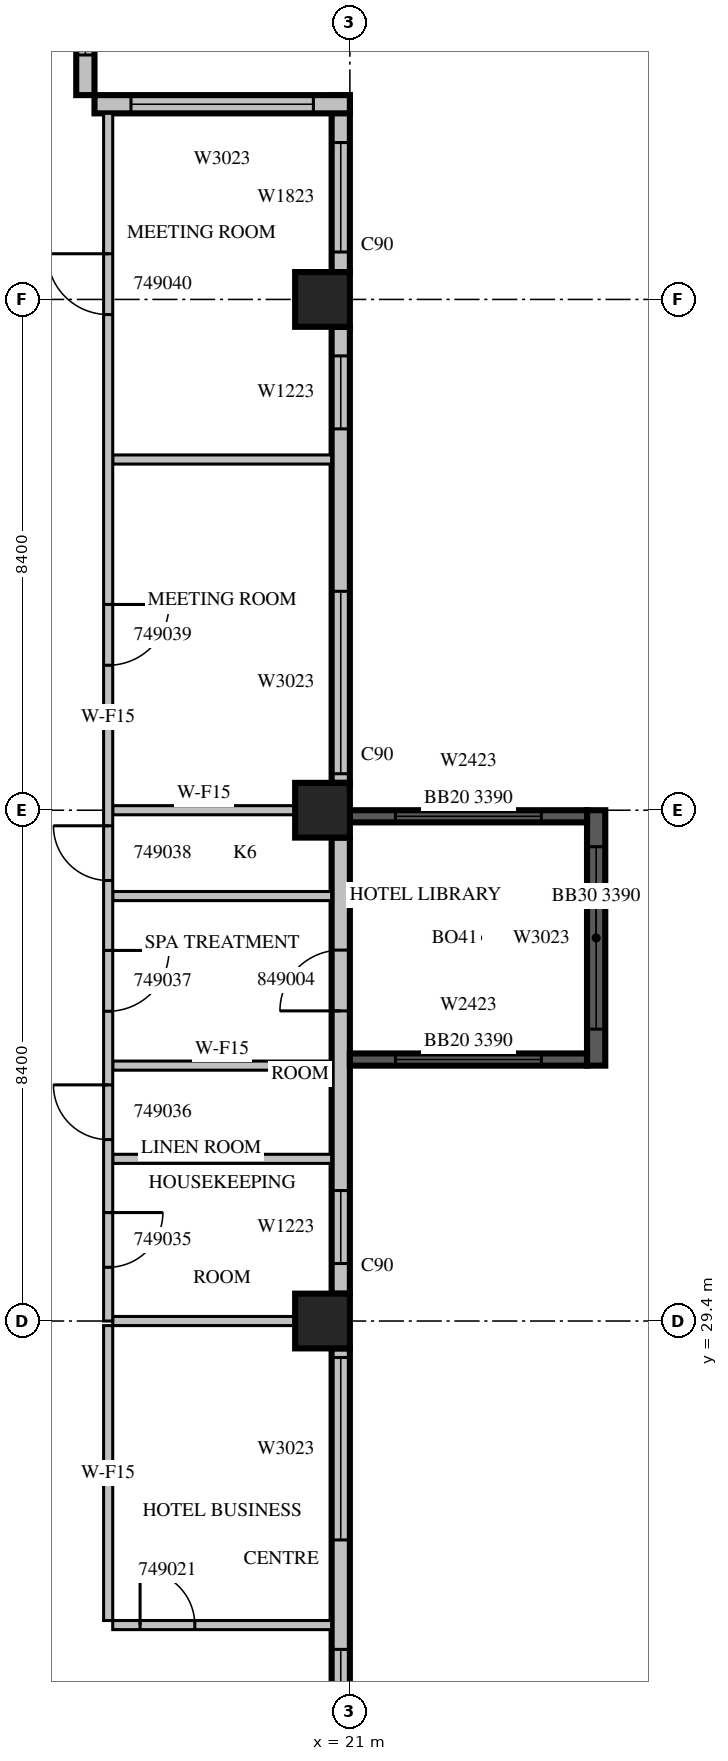
"""IFC4 building model, lengths in metres.
Left out: names, types, materials, properties, quantities, classifications, styles, units other than length and angle.
Written with IfcOpenShell. Run it as: python <this file> out.ifc"""

import sys

from ifc_helpers import new_model, si_unit, direction, frame, frame_2d, origin, origin_2d, place, context, subcontext, project, spatial, rectangle, extrude, source, transform, mapped, element, fill, save


model = new_model("IFC4")
c1 = context("Model", 3, precision=1e-05, world=origin(), true_north=direction((0.0, 1.0)))
c2 = subcontext(c1, "Body", "Model", "MODEL_VIEW")
j1 = project(units=[si_unit("LENGTHUNIT", "METRE"), si_unit("PLANEANGLEUNIT", "RADIAN")], contexts=[c1])
p1 = place(None, origin())
s1 = spatial("IfcSite", under=j1, at=p1, CompositionType="ELEMENT")
p2 = place(p1, origin())
s2 = spatial("IfcBuilding", under=s1, at=p2, CompositionType="ELEMENT")
p3 = place(p2, frame((0.0, 0.0, 219.6)))
s3 = spatial("IfcBuildingStorey", under=s2, at=p3, CompositionType="ELEMENT", Elevation=219.6)
m1 = source(origin(), c2, "Body", "SweptSolid", [
    extrude(rectangle(XDim=0.9, YDim=0.9, at=origin_2d()), origin(), (0.0, 0.0, 1.0), 3.8),
])
for number, where, z_axis, x_axis in (
    (1, (20.55, 29.4, 0.0), (0.0, 0.0, 1.0), (1.0, 0.0, 0.0)),
    (2, (20.55, 37.8, 0.0), (0.0, 0.0, 1.0), (1.0, 0.0, 0.0)),
    (3, (20.55, 46.2, 0.0), (0.0, 0.0, 1.0), (1.0, 0.0, 0.0)),
):
    element("IfcColumn", number, at=place(p3, frame(where, z_axis=z_axis, x_axis=x_axis)), inside=s3, PredefinedType="COLUMN", context=c2, shape_type="MappedRepresentation", body=[
        mapped(m1, transform((0.0, 0.0, 0.0), scale=1.0)),
    ])
m2 = source(origin(), c2, "Body", "SweptSolid", [
    extrude(rectangle(XDim=7.15, YDim=0.3, at=frame_2d((3.575, 0.0))), origin(), (0.0, 0.0, 1.0), 3.4),
])
p4 = place(p3, frame((20.85, 21.8, 0.0), z_axis=(0.0, 0.0, 1.0), x_axis=(0.0, 1.0, 0.0)))
e4 = element("IfcWall", 4, at=p4, inside=s3, PredefinedType="STANDARD", context=c2, shape_type="MappedRepresentation", body=[
    mapped(m2, transform((0.0, 0.0, 0.0), scale=1.0)),
])
m3 = source(origin(), c2, "Body", "SweptSolid", [
    extrude(rectangle(XDim=1.8, YDim=2.3, at=frame_2d((0.9, 1.15))), frame((0.0, 0.16, 0.0), z_axis=(0.0, -1.0, 0.0), x_axis=(1.0, 0.0, 0.0)), (0.0, 0.0, 1.0), 0.32),
])
p5 = place(p4, frame((0.4, 0.0, 0.6)))
e5 = element("IfcOpeningElement", 5, at=p5, cuts=e4, PredefinedType="OPENING", context=c2, shape_type="MappedRepresentation", body=[
    mapped(m3, transform((0.0, 0.0, 0.0), scale=1.0)),
])
m4 = source(origin(), c2, "Body", "SweptSolid", [
    extrude(rectangle(XDim=3.0, YDim=2.3, at=frame_2d((1.5, 1.15))), frame((0.0, 0.16, 0.0), z_axis=(0.0, -1.0, 0.0), x_axis=(1.0, 0.0, 0.0)), (0.0, 0.0, 1.0), 0.32),
])
p6 = place(p4, frame((4.0, 0.0, 0.6)))
e6 = element("IfcOpeningElement", 6, at=p6, cuts=e4, PredefinedType="OPENING", context=c2, shape_type="MappedRepresentation", body=[
    mapped(m4, transform((0.0, 0.0, 0.0), scale=1.0)),
])
m5 = source(origin(), c2, "Body", "SweptSolid", [
    extrude(rectangle(XDim=7.5, YDim=0.3, at=frame_2d((3.75, 0.0))), origin(), (0.0, 0.0, 1.0), 3.4),
])
p7 = place(p3, frame((20.85, 29.85, 0.0), z_axis=(0.0, 0.0, 1.0), x_axis=(0.0, 1.0, 0.0)))
e7 = element("IfcWall", 7, at=p7, inside=s3, PredefinedType="STANDARD", context=c2, shape_type="MappedRepresentation", body=[
    mapped(m5, transform((0.0, 0.0, 0.0), scale=1.0)),
])
m6 = source(origin(), c2, "Body", "SweptSolid", [
    extrude(rectangle(XDim=1.2, YDim=2.3, at=frame_2d((0.6, 1.15))), frame((0.0, 0.16, 0.0), z_axis=(0.0, -1.0, 0.0), x_axis=(1.0, 0.0, 0.0)), (0.0, 0.0, 1.0), 0.32),
])
p8 = place(p7, frame((0.496, 0.0, 0.6)))
e8 = element("IfcOpeningElement", 8, at=p8, cuts=e7, PredefinedType="OPENING", context=c2, shape_type="MappedRepresentation", body=[
    mapped(m6, transform((0.0, 0.0, 0.0), scale=1.0)),
])
m7 = source(origin(), c2, "Body", "SweptSolid", [
    extrude(rectangle(XDim=1.0, YDim=2.1, at=frame_2d((0.5, 1.05))), frame((0.0, 0.16, 0.0), z_axis=(0.0, -1.0, 0.0), x_axis=(1.0, 0.0, 0.0)), (0.0, 0.0, 1.0), 0.32),
])
p9 = place(p7, frame((4.65, 0.0, 0.0)))
e9 = element("IfcOpeningElement", 9, at=p9, cuts=e7, PredefinedType="OPENING", context=c2, shape_type="MappedRepresentation", body=[
    mapped(m7, transform((0.0, 0.0, 0.0), scale=1.0)),
])
p10 = place(p3, frame((20.85, 38.25, 0.0), z_axis=(0.0, 0.0, 1.0), x_axis=(0.0, 1.0, 0.0)))
e10 = element("IfcWall", 10, at=p10, inside=s3, PredefinedType="STANDARD", context=c2, shape_type="MappedRepresentation", body=[
    mapped(m5, transform((0.0, 0.0, 0.0), scale=1.0)),
])
p11 = place(p10, frame((0.15, 0.0, 0.6)))
e11 = element("IfcOpeningElement", 11, at=p11, cuts=e10, PredefinedType="OPENING", context=c2, shape_type="MappedRepresentation", body=[
    mapped(m4, transform((0.0, 0.0, 0.0), scale=1.0)),
])
p12 = place(p10, frame((5.822, 0.0, 0.6)))
e12 = element("IfcOpeningElement", 12, at=p12, cuts=e10, PredefinedType="OPENING", context=c2, shape_type="MappedRepresentation", body=[
    mapped(m6, transform((0.0, 0.0, 0.0), scale=1.0)),
])
m8 = source(origin(), c2, "Body", "SweptSolid", [
    extrude(rectangle(XDim=2.91, YDim=0.3, at=frame_2d((1.455, 0.0))), origin(), (0.0, 0.0, 1.0), 3.4),
])
p13 = place(p3, frame((20.85, 46.65, 0.0), z_axis=(0.0, 0.0, 1.0), x_axis=(0.0, 1.0, 0.0)))
e13 = element("IfcWall", 13, at=p13, inside=s3, PredefinedType="STANDARD", context=c2, shape_type="MappedRepresentation", body=[
    mapped(m8, transform((0.0, 0.0, 0.0), scale=1.0)),
])
p14 = place(p13, frame((0.33, 0.0, 0.6)))
e14 = element("IfcOpeningElement", 14, at=p14, cuts=e13, PredefinedType="OPENING", context=c2, shape_type="MappedRepresentation", body=[
    mapped(m3, transform((0.0, 0.0, 0.0), scale=1.0)),
])
m9 = source(origin(), c2, "Body", "SweptSolid", [
    extrude(rectangle(XDim=4.2, YDim=0.3, at=frame_2d((2.1, 0.0))), origin(), (0.0, 0.0, 1.0), 3.4),
])
p15 = place(p3, frame((21.0, 49.41, 0.0), z_axis=(0.0, 0.0, 1.0), x_axis=(-1.0, 0.0, 0.0)))
e15 = element("IfcWall", 15, at=p15, inside=s3, PredefinedType="STANDARD", context=c2, shape_type="MappedRepresentation", body=[
    mapped(m9, transform((0.0, 0.0, 0.0), scale=1.0)),
])
p16 = place(p15, frame((0.6, 0.0, 0.6)))
e16 = element("IfcOpeningElement", 16, at=p16, cuts=e15, PredefinedType="OPENING", context=c2, shape_type="MappedRepresentation", body=[
    mapped(m4, transform((0.0, 0.0, 0.0), scale=1.0)),
])
m10 = source(origin(), c2, "Body", "SweptSolid", [
    extrude(rectangle(XDim=2.52, YDim=0.3, at=frame_2d((1.26, 0.0))), origin(), (0.0, 0.0, 1.0), 3.4),
])
p17 = place(p3, frame((16.65, 49.56, 0.0), z_axis=(0.0, 0.0, 1.0), x_axis=(0.0, 1.0, 0.0)))
e17 = element("IfcWall", 17, at=p17, inside=s3, PredefinedType="STANDARD", context=c2, shape_type="MappedRepresentation", body=[
    mapped(m10, transform((0.0, 0.0, 0.0), scale=1.0)),
])
p18 = place(p17, frame((0.66, 0.0, 0.6)))
e18 = element("IfcOpeningElement", 18, at=p18, cuts=e17, PredefinedType="OPENING", context=c2, shape_type="MappedRepresentation", body=[
    mapped(m6, transform((0.0, 0.0, 0.0), scale=1.0)),
])
m11 = source(origin(), c2, "Body", "SweptSolid", [
    extrude(rectangle(XDim=4.2, YDim=0.3, at=frame_2d((2.1, 0.0))), origin(), (0.0, 0.0, 1.0), 3.39),
])
p19 = place(p3, frame((25.05, 33.6, 0.0), z_axis=(0.0, 0.0, 1.0), x_axis=(0.0, 1.0, 0.0)))
e19 = element("IfcWall", 19, at=p19, inside=s3, PredefinedType="SOLIDWALL", context=c2, shape_type="MappedRepresentation", body=[
    mapped(m11, transform((0.0, 0.0, 0.0), scale=1.0)),
])
p20 = place(p19, frame((0.6, 0.0, 0.6)))
e20 = element("IfcOpeningElement", 20, at=p20, cuts=e19, PredefinedType="OPENING", context=c2, shape_type="MappedRepresentation", body=[
    mapped(m4, transform((0.0, 0.0, 0.0), scale=1.0)),
])
m12 = source(origin(), c2, "Body", "SweptSolid", [
    extrude(rectangle(XDim=3.9, YDim=0.2, at=frame_2d((1.95, 0.0))), origin(), (0.0, 0.0, 1.0), 3.39),
])
p21 = place(p3, frame((21.0, 33.7, 0.0), z_axis=(0.0, 0.0, 1.0), x_axis=(1.0, 0.0, 0.0)))
e21 = element("IfcWall", 21, at=p21, inside=s3, PredefinedType="SOLIDWALL", context=c2, shape_type="MappedRepresentation", body=[
    mapped(m12, transform((0.0, 0.0, 0.0), scale=1.0)),
])
m13 = source(origin(), c2, "Body", "SweptSolid", [
    extrude(rectangle(XDim=2.4, YDim=2.3, at=frame_2d((1.2, 1.15))), frame((0.0, 0.11, 0.0), z_axis=(0.0, -1.0, 0.0), x_axis=(1.0, 0.0, 0.0)), (0.0, 0.0, 1.0), 0.22),
])
p22 = place(p21, frame((0.75, 0.0, 0.6)))
e22 = element("IfcOpeningElement", 22, at=p22, cuts=e21, PredefinedType="OPENING", context=c2, shape_type="MappedRepresentation", body=[
    mapped(m13, transform((0.0, 0.0, 0.0), scale=1.0)),
])
p23 = place(p3, frame((21.0, 37.7, 0.0), z_axis=(0.0, 0.0, 1.0), x_axis=(1.0, 0.0, 0.0)))
e23 = element("IfcWall", 23, at=p23, inside=s3, PredefinedType="SOLIDWALL", context=c2, shape_type="MappedRepresentation", body=[
    mapped(m12, transform((0.0, 0.0, 0.0), scale=1.0)),
])
p24 = place(p23, frame((0.75, 0.0, 0.6)))
e24 = element("IfcOpeningElement", 24, at=p24, cuts=e23, PredefinedType="OPENING", context=c2, shape_type="MappedRepresentation", body=[
    mapped(m13, transform((0.0, 0.0, 0.0), scale=1.0)),
])
m14 = source(origin(), c2, "Body", "SweptSolid", [
    extrude(rectangle(XDim=3.6, YDim=0.15, at=frame_2d((1.8, 0.0))), origin(), (0.0, 0.0, 1.0), 3.4),
])
p25 = place(p3, frame((17.1, 24.4, 0.0), z_axis=(0.0, 0.0, 1.0), x_axis=(1.0, 0.0, 0.0)))
e25 = element("IfcWall", 25, at=p25, inside=s3, PredefinedType="PARTITIONING", context=c2, shape_type="MappedRepresentation", body=[
    mapped(m14, transform((0.0, 0.0, 0.0), scale=1.0)),
])
m15 = source(origin(), c2, "Body", "SweptSolid", [
    extrude(rectangle(XDim=0.9, YDim=2.1, at=frame_2d((0.45, 1.05))), frame((0.0, 0.085, 0.0), z_axis=(0.0, -1.0, 0.0), x_axis=(1.0, 0.0, 0.0)), (0.0, 0.0, 1.0), 0.17),
])
p26 = place(p25, frame((0.45, 0.0, 0.0)))
e26 = element("IfcOpeningElement", 26, at=p26, cuts=e25, PredefinedType="OPENING", context=c2, shape_type="MappedRepresentation", body=[
    mapped(m15, transform((0.0, 0.0, 0.0), scale=1.0)),
])
m16 = source(origin(), c2, "Body", "SweptSolid", [
    extrude(rectangle(XDim=4.85, YDim=0.15, at=frame_2d((2.425, 0.0))), origin(), (0.0, 0.0, 1.0), 3.4),
])
p27 = place(p3, frame((17.025, 29.325, 0.0), z_axis=(0.0, 0.0, 1.0), x_axis=(0.0, -1.0, 0.0)))
e27 = element("IfcWall", 27, at=p27, inside=s3, PredefinedType="PARTITIONING", context=c2, shape_type="MappedRepresentation", body=[
    mapped(m16, transform((0.0, 0.0, 0.0), scale=1.0)),
])
m17 = source(origin(), c2, "Body", "SweptSolid", [
    extrude(rectangle(XDim=3.001, YDim=0.15, at=frame_2d((1.5, 0.0))), origin(), (0.0, 0.0, 1.0), 3.4),
])
p28 = place(p3, frame((20.101, 29.4, 0.0), z_axis=(0.0, 0.0, 1.0), x_axis=(-1.0, 0.0, 0.0)))
e28 = element("IfcWall", 28, at=p28, inside=s3, PredefinedType="PARTITIONING", context=c2, shape_type="MappedRepresentation", body=[
    mapped(m17, transform((0.0, 0.0, 0.0), scale=1.0)),
])
for number, where, z_axis, x_axis in (
    (29, (17.1, 32.067, 0.0), (0.0, 0.0, 1.0), (1.0, 0.0, 0.0)),
    (30, (17.1, 36.389, 0.0), (0.0, 0.0, 1.0), (1.0, 0.0, 0.0)),
    (31, (17.1, 43.568, 0.0), (0.0, 0.0, 1.0), (1.0, 0.0, 0.0)),
    (32, (20.7, 33.6, 0.0), (0.0, 0.0, 1.0), (-1.0, 0.0, 0.0)),
):
    element("IfcWall", number, at=place(p3, frame(where, z_axis=z_axis, x_axis=x_axis)), inside=s3, PredefinedType="PARTITIONING", context=c2, shape_type="MappedRepresentation", body=[
        mapped(m14, transform((0.0, 0.0, 0.0), scale=1.0)),
    ])
p29 = place(p3, frame((20.101, 37.8, 0.0), z_axis=(0.0, 0.0, 1.0), x_axis=(-1.0, 0.0, 0.0)))
e33 = element("IfcWall", 33, at=p29, inside=s3, PredefinedType="PARTITIONING", context=c2, shape_type="MappedRepresentation", body=[
    mapped(m17, transform((0.0, 0.0, 0.0), scale=1.0)),
])
m18 = source(origin(), c2, "Body", "SweptSolid", [
    extrude(rectangle(XDim=19.86, YDim=0.15, at=frame_2d((9.93, 0.0))), origin(), (0.0, 0.0, 1.0), 3.4),
])
p30 = place(p3, frame((17.025, 49.26, 0.0), z_axis=(0.0, 0.0, 1.0), x_axis=(0.0, -1.0, 0.0)))
e34 = element("IfcWall", 34, at=p30, inside=s3, PredefinedType="PARTITIONING", context=c2, shape_type="MappedRepresentation", body=[
    mapped(m18, transform((0.0, 0.0, 0.0), scale=1.0)),
])
p31 = place(p30, frame((18.076, 0.0, 0.0)))
e35 = element("IfcOpeningElement", 35, at=p31, cuts=e34, PredefinedType="OPENING", context=c2, shape_type="MappedRepresentation", body=[
    mapped(m15, transform((0.0, 0.0, 0.0), scale=1.0)),
])
p32 = place(p30, frame((15.976, 0.0, 0.0)))
e36 = element("IfcOpeningElement", 36, at=p32, cuts=e34, PredefinedType="OPENING", context=c2, shape_type="MappedRepresentation", body=[
    mapped(m15, transform((0.0, 0.0, 0.0), scale=1.0)),
])
m19 = source(origin(), c2, "Body", "SweptSolid", [
    extrude(rectangle(XDim=1.0, YDim=2.1, at=frame_2d((0.5, 1.05))), frame((0.0, 0.085, 0.0), z_axis=(0.0, -1.0, 0.0), x_axis=(1.0, 0.0, 0.0)), (0.0, 0.0, 1.0), 0.17),
])
p33 = place(p30, frame((13.766, 0.0, 0.0)))
e37 = element("IfcOpeningElement", 37, at=p33, cuts=e34, PredefinedType="OPENING", context=c2, shape_type="MappedRepresentation", body=[
    mapped(m19, transform((0.0, 0.0, 0.0), scale=1.0)),
])
p34 = place(p30, frame((11.716, 0.0, 0.0)))
e38 = element("IfcOpeningElement", 38, at=p34, cuts=e34, PredefinedType="OPENING", context=c2, shape_type="MappedRepresentation", body=[
    mapped(m15, transform((0.0, 0.0, 0.0), scale=1.0)),
])
p35 = place(p30, frame((8.076, 0.0, 0.0)))
e39 = element("IfcOpeningElement", 39, at=p35, cuts=e34, PredefinedType="OPENING", context=c2, shape_type="MappedRepresentation", body=[
    mapped(m19, transform((0.0, 0.0, 0.0), scale=1.0)),
])
p36 = place(p30, frame((2.309, 0.0, 0.0)))
e40 = element("IfcOpeningElement", 40, at=p36, cuts=e34, PredefinedType="OPENING", context=c2, shape_type="MappedRepresentation", body=[
    mapped(m19, transform((0.0, 0.0, 0.0), scale=1.0)),
])
m20 = source(origin(), c2, "Body", "SweptSolid", [
    extrude(rectangle(XDim=1.8, YDim=2.3, at=frame_2d((0.9, 1.15))), frame((0.0, 0.03, 0.0), z_axis=(0.0, -1.0, 0.0), x_axis=(1.0, 0.0, 0.0)), (0.0, 0.0, 1.0), 0.06),
])
p37 = place(p5, origin())
e41 = element("IfcWindow", 41, at=p37, inside=s3, PartitioningType="SINGLE_PANEL", PredefinedType="WINDOW", context=c2, shape_type="MappedRepresentation", body=[
    mapped(m20, transform((0.0, 0.0, 0.0), scale=1.0)),
])
fill(e5, e41)
m21 = source(origin(), c2, "Body", "SweptSolid", [
    extrude(rectangle(XDim=3.0, YDim=2.3, at=frame_2d((1.5, 1.15))), frame((0.0, 0.03, 0.0), z_axis=(0.0, -1.0, 0.0), x_axis=(1.0, 0.0, 0.0)), (0.0, 0.0, 1.0), 0.06),
])
p38 = place(p6, origin())
e42 = element("IfcWindow", 42, at=p38, inside=s3, PartitioningType="SINGLE_PANEL", PredefinedType="WINDOW", context=c2, shape_type="MappedRepresentation", body=[
    mapped(m21, transform((0.0, 0.0, 0.0), scale=1.0)),
])
fill(e6, e42)
m22 = source(origin(), c2, "Body", "SweptSolid", [
    extrude(rectangle(XDim=1.2, YDim=2.3, at=frame_2d((0.6, 1.15))), frame((0.0, 0.03, 0.0), z_axis=(0.0, -1.0, 0.0), x_axis=(1.0, 0.0, 0.0)), (0.0, 0.0, 1.0), 0.06),
])
p39 = place(p8, origin())
e43 = element("IfcWindow", 43, at=p39, inside=s3, PartitioningType="SINGLE_PANEL", PredefinedType="WINDOW", context=c2, shape_type="MappedRepresentation", body=[
    mapped(m22, transform((0.0, 0.0, 0.0), scale=1.0)),
])
fill(e8, e43)
p40 = place(p11, origin())
e44 = element("IfcWindow", 44, at=p40, inside=s3, PartitioningType="SINGLE_PANEL", PredefinedType="WINDOW", context=c2, shape_type="MappedRepresentation", body=[
    mapped(m21, transform((0.0, 0.0, 0.0), scale=1.0)),
])
fill(e11, e44)
p41 = place(p12, origin())
e45 = element("IfcWindow", 45, at=p41, inside=s3, PartitioningType="SINGLE_PANEL", PredefinedType="WINDOW", context=c2, shape_type="MappedRepresentation", body=[
    mapped(m22, transform((0.0, 0.0, 0.0), scale=1.0)),
])
fill(e12, e45)
p42 = place(p14, origin())
e46 = element("IfcWindow", 46, at=p42, inside=s3, PartitioningType="SINGLE_PANEL", PredefinedType="WINDOW", context=c2, shape_type="MappedRepresentation", body=[
    mapped(m20, transform((0.0, 0.0, 0.0), scale=1.0)),
])
fill(e14, e46)
p43 = place(p16, origin())
e47 = element("IfcWindow", 47, at=p43, inside=s3, PartitioningType="SINGLE_PANEL", PredefinedType="WINDOW", context=c2, shape_type="MappedRepresentation", body=[
    mapped(m21, transform((0.0, 0.0, 0.0), scale=1.0)),
])
fill(e16, e47)
p44 = place(p18, origin())
e48 = element("IfcWindow", 48, at=p44, inside=s3, PartitioningType="SINGLE_PANEL", PredefinedType="WINDOW", context=c2, shape_type="MappedRepresentation", body=[
    mapped(m22, transform((0.0, 0.0, 0.0), scale=1.0)),
])
fill(e18, e48)
p45 = place(p20, origin())
e49 = element("IfcWindow", 49, at=p45, inside=s3, PartitioningType="SINGLE_PANEL", PredefinedType="WINDOW", context=c2, shape_type="MappedRepresentation", body=[
    mapped(m21, transform((0.0, 0.0, 0.0), scale=1.0)),
])
fill(e20, e49)
m23 = source(origin(), c2, "Body", "SweptSolid", [
    extrude(rectangle(XDim=2.4, YDim=2.3, at=frame_2d((1.2, 1.15))), frame((0.0, 0.03, 0.0), z_axis=(0.0, -1.0, 0.0), x_axis=(1.0, 0.0, 0.0)), (0.0, 0.0, 1.0), 0.06),
])
p46 = place(p22, origin())
e50 = element("IfcWindow", 50, at=p46, inside=s3, PartitioningType="SINGLE_PANEL", PredefinedType="WINDOW", context=c2, shape_type="MappedRepresentation", body=[
    mapped(m23, transform((0.0, 0.0, 0.0), scale=1.0)),
])
fill(e22, e50)
p47 = place(p24, origin())
e51 = element("IfcWindow", 51, at=p47, inside=s3, PartitioningType="SINGLE_PANEL", PredefinedType="WINDOW", context=c2, shape_type="MappedRepresentation", body=[
    mapped(m23, transform((0.0, 0.0, 0.0), scale=1.0)),
])
fill(e24, e51)
m24 = source(origin(), c2, "Body", "SweptSolid", [
    extrude(rectangle(XDim=0.9, YDim=2.1, at=frame_2d((0.45, 1.05))), frame((0.0, 0.025, 0.0), z_axis=(0.0, -1.0, 0.0), x_axis=(1.0, 0.0, 0.0)), (0.0, 0.0, 1.0), 0.05),
])
p48 = place(p26, origin())
e52 = element("IfcDoor", 52, at=p48, inside=s3, OperationType="SINGLE_SWING_LEFT", PredefinedType="DOOR", context=c2, shape_type="MappedRepresentation", body=[
    mapped(m24, transform((0.0, 0.0, 0.0), scale=1.0)),
])
fill(e26, e52)
p49 = place(p31, origin())
e53 = element("IfcDoor", 53, at=p49, inside=s3, OperationType="SINGLE_SWING_LEFT", PredefinedType="DOOR", context=c2, shape_type="MappedRepresentation", body=[
    mapped(m24, transform((0.0, 0.0, 0.0), scale=1.0)),
])
fill(e35, e53)
p50 = place(p32, origin())
e54 = element("IfcDoor", 54, at=p50, inside=s3, OperationType="SINGLE_SWING_RIGHT", PredefinedType="DOOR", context=c2, shape_type="MappedRepresentation", body=[
    mapped(m24, transform((0.0, 0.0, 0.0), scale=1.0)),
])
fill(e36, e54)
m25 = source(origin(), c2, "Body", "SweptSolid", [
    extrude(rectangle(XDim=1.0, YDim=2.1, at=frame_2d((0.5, 1.05))), frame((0.0, 0.025, 0.0), z_axis=(0.0, -1.0, 0.0), x_axis=(1.0, 0.0, 0.0)), (0.0, 0.0, 1.0), 0.05),
])
p51 = place(p33, origin())
e55 = element("IfcDoor", 55, at=p51, inside=s3, OperationType="SINGLE_SWING_LEFT", PredefinedType="DOOR", context=c2, shape_type="MappedRepresentation", body=[
    mapped(m25, transform((0.0, 0.0, 0.0), scale=1.0)),
])
fill(e37, e55)
p52 = place(p34, origin())
e56 = element("IfcDoor", 56, at=p52, inside=s3, OperationType="SINGLE_SWING_RIGHT", PredefinedType="DOOR", context=c2, shape_type="MappedRepresentation", body=[
    mapped(m24, transform((0.0, 0.0, 0.0), scale=1.0)),
])
fill(e38, e56)
p53 = place(p35, origin())
e57 = element("IfcDoor", 57, at=p53, inside=s3, OperationType="SINGLE_SWING_LEFT", PredefinedType="DOOR", context=c2, shape_type="MappedRepresentation", body=[
    mapped(m25, transform((0.0, 0.0, 0.0), scale=1.0)),
])
fill(e39, e57)
p54 = place(p36, origin())
e58 = element("IfcDoor", 58, at=p54, inside=s3, OperationType="SINGLE_SWING_RIGHT", PredefinedType="DOOR", context=c2, shape_type="MappedRepresentation", body=[
    mapped(m25, transform((0.0, 0.0, 0.0), scale=1.0)),
])
fill(e40, e58)
p55 = place(p9, origin())
e59 = element("IfcDoor", 59, at=p55, inside=s3, OperationType="SINGLE_SWING_LEFT", PredefinedType="DOOR", context=c2, shape_type="MappedRepresentation", body=[
    mapped(m25, transform((0.0, 0.0, 0.0), scale=1.0)),
])
fill(e9, e59)
save(model, sys.argv[1])
